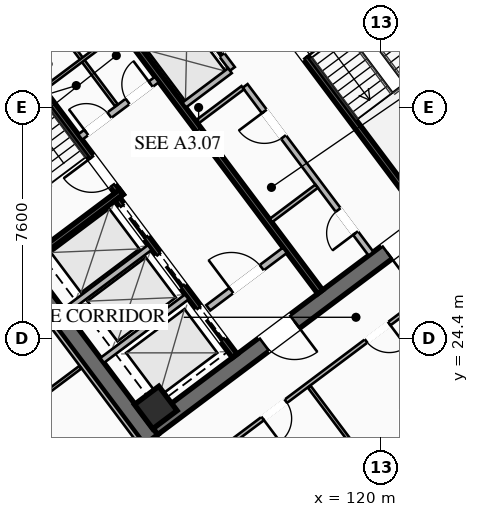
"""IFC4 building model, lengths in metres.
Left out: names, types, materials, properties, quantities, classifications, styles, units other than length and angle.
Written with IfcOpenShell. Run it as: python <this file> out.ifc"""

import sys

from ifc_helpers import new_model, si_unit, direction, frame, frame_2d, origin, origin_2d, place, context, subcontext, project, spatial, rectangle, hollow_rectangle, extrude, element, fill, save


model = new_model("IFC4")
c1 = context("Model", 3, precision=1e-05, world=origin(), true_north=direction((0.0, 1.0)))
c2 = subcontext(c1, "Body", "Model", "MODEL_VIEW")
j1 = project(units=[si_unit("LENGTHUNIT", "METRE"), si_unit("PLANEANGLEUNIT", "RADIAN")], contexts=[c1])
p1 = place(None, origin())
s1 = spatial("IfcSite", under=j1, at=p1, CompositionType="ELEMENT")
p2 = place(p1, origin())
s2 = spatial("IfcBuilding", under=s1, at=p2, CompositionType="ELEMENT")
p3 = place(p2, frame((0.0, 0.0, 174.75)))
s3 = spatial("IfcBuildingStorey", under=s2, at=p3, CompositionType="ELEMENT", Elevation=174.75)
for number, where, z_axis, x_axis in (
    (1, (112.436, 21.077, 0.0), (0.0, 0.0, 1.0), (-0.6, 0.8, 0.0)),
    (2, (115.564, 42.923, 0.0), (0.0, 0.0, 1.0), (0.6, -0.8, 0.0)),
):
    element("IfcWall", number, at=place(p3, frame(where, z_axis=z_axis, x_axis=x_axis)), inside=s3, PredefinedType="SHEAR", context=c2, shape_type="SweptSolid", body=[
        extrude(rectangle(XDim=15.6, YDim=0.55, at=frame_2d((7.8, 0.0))), origin(), (0.0, 0.0, 1.0), 3.55),
    ])
p4 = place(p3, frame((124.539, 30.498, 0.0), z_axis=(0.0, 0.0, 1.0), x_axis=(-0.799998054672, -0.600002593761, 0.0)))
e3 = element("IfcWall", 3, at=p4, inside=s3, PredefinedType="SHEAR", context=c2, shape_type="SweptSolid", body=[
    extrude(rectangle(XDim=15.06, YDim=0.55, at=frame_2d((7.53, 0.0))), origin(), (0.0, 0.0, 1.0), 3.55),
])
p5 = place(p4, frame((9.23, 0.0, 0.0)))
e4 = element("IfcOpeningElement", 4, at=p5, cuts=e3, PredefinedType="OPENING", context=c2, shape_type="SweptSolid", body=[
    extrude(rectangle(XDim=1.25, YDim=2.25, at=frame_2d((0.625, 1.125))), frame((0.0, 0.285, 0.0), z_axis=(0.0, -1.0, 0.0), x_axis=(1.0, 0.0, 0.0)), (0.0, 0.0, 1.0), 0.57),
])
p6 = place(p4, frame((4.18, 0.0, 0.0)))
e5 = element("IfcOpeningElement", 5, at=p6, cuts=e3, PredefinedType="OPENING", context=c2, shape_type="SweptSolid", body=[
    extrude(rectangle(XDim=1.25, YDim=2.25, at=frame_2d((0.625, 1.125))), frame((0.0, 0.285, 0.0), z_axis=(0.0, -1.0, 0.0), x_axis=(1.0, 0.0, 0.0)), (0.0, 0.0, 1.0), 0.57),
])
p7 = place(p3, frame((103.461, 33.502, 0.0), z_axis=(0.0, 0.0, 1.0), x_axis=(0.799998054672, 0.600002593761, 0.0)))
e6 = element("IfcWall", 6, at=p7, inside=s3, PredefinedType="SHEAR", context=c2, shape_type="SweptSolid", body=[
    extrude(rectangle(XDim=15.06, YDim=0.55, at=frame_2d((7.53, 0.0))), origin(), (0.0, 0.0, 1.0), 3.55),
])
p8 = place(p7, frame((4.58, 0.0, 0.0)))
e7 = element("IfcOpeningElement", 7, at=p8, cuts=e6, PredefinedType="OPENING", context=c2, shape_type="SweptSolid", body=[
    extrude(rectangle(XDim=1.25, YDim=2.25, at=frame_2d((0.625, 1.125))), frame((0.0, 0.285, 0.0), z_axis=(0.0, -1.0, 0.0), x_axis=(1.0, 0.0, 0.0)), (0.0, 0.0, 1.0), 0.57),
])
p9 = place(p7, frame((9.63, 0.0, 0.0)))
e8 = element("IfcOpeningElement", 8, at=p9, cuts=e6, PredefinedType="OPENING", context=c2, shape_type="SweptSolid", body=[
    extrude(rectangle(XDim=1.25, YDim=2.25, at=frame_2d((0.625, 1.125))), frame((0.0, 0.285, 0.0), z_axis=(0.0, -1.0, 0.0), x_axis=(1.0, 0.0, 0.0)), (0.0, 0.0, 1.0), 0.57),
])
p10 = place(p3, frame((112.59, 22.13, 0.0), z_axis=(0.0, 0.0, 1.0), x_axis=(0.799999996291, 0.600000004945, 0.0)))
e9 = element("IfcColumn", 9, at=p10, inside=s3, PredefinedType="COLUMN", context=c2, shape_type="SweptSolid", body=[
    extrude(hollow_rectangle(XDim=1.0, YDim=1.0, WallThickness=0.04, at=origin_2d()), origin(), (0.0, 0.0, 1.0), 3.37),
])
p11 = place(p3, frame((111.44, 29.08, 0.0), z_axis=(0.0, 0.0, 1.0), x_axis=(-0.59999029481, 0.8000072788, 0.0)))
e10 = element("IfcWall", 10, at=p11, inside=s3, PredefinedType="SHEAR", context=c2, shape_type="SweptSolid", body=[
    extrude(rectangle(XDim=8.05, YDim=0.2, at=frame_2d((4.025, 0.0))), origin(), (0.0, 0.0, 1.0), 3.37),
])
p12 = place(p11, frame((0.45, 0.0, 0.0)))
e11 = element("IfcOpeningElement", 11, at=p12, cuts=e10, PredefinedType="OPENING", context=c2, shape_type="SweptSolid", body=[
    extrude(rectangle(XDim=1.15, YDim=2.2, at=frame_2d((0.575, 1.1))), frame((0.0, 0.11, 0.0), z_axis=(0.0, -1.0, 0.0), x_axis=(1.0, 0.0, 0.0)), (0.0, 0.0, 1.0), 0.22),
])
p13 = place(p3, frame((108.396, 26.922, 0.0), z_axis=(0.0, 0.0, 1.0), x_axis=(0.800015298837, 0.599979601008, 0.0)))
e12 = element("IfcWall", 12, at=p13, inside=s3, PredefinedType="SHEAR", context=c2, shape_type="SweptSolid", body=[
    extrude(rectangle(XDim=3.83, YDim=0.2, at=frame_2d((1.915, 0.0))), origin(), (0.0, 0.0, 1.0), 3.37),
])
p14 = place(p3, frame((116.56, 34.92, 0.0), z_axis=(0.0, 0.0, 1.0), x_axis=(0.59999029481, -0.8000072788, 0.0)))
e13 = element("IfcWall", 13, at=p14, inside=s3, PredefinedType="SHEAR", context=c2, shape_type="SweptSolid", body=[
    extrude(rectangle(XDim=8.05, YDim=0.2, at=frame_2d((4.025, 0.0))), origin(), (0.0, 0.0, 1.0), 3.37),
])
p15 = place(p14, frame((0.45, 0.0, 0.0)))
e14 = element("IfcOpeningElement", 14, at=p15, cuts=e13, PredefinedType="OPENING", context=c2, shape_type="SweptSolid", body=[
    extrude(rectangle(XDim=1.15, YDim=2.2, at=frame_2d((0.575, 1.1))), frame((0.0, 0.11, 0.0), z_axis=(0.0, -1.0, 0.0), x_axis=(1.0, 0.0, 0.0)), (0.0, 0.0, 1.0), 0.22),
])
p16 = place(p3, frame((117.998, 25.936, 0.0), z_axis=(0.0, 0.0, 1.0), x_axis=(-0.600002693989, 0.799997979501, 0.0)))
e15 = element("IfcWall", 15, at=p16, inside=s3, PredefinedType="SHEAR", context=c2, shape_type="SweptSolid", body=[
    extrude(rectangle(XDim=14.5, YDim=0.2, at=frame_2d((7.25, 0.0))), origin(), (0.0, 0.0, 1.0), 3.37),
])
p17 = place(p3, frame((110.104, 31.028, 0.0), z_axis=(0.0, 0.0, 1.0), x_axis=(0.800018601094, 0.59997519774, 0.0)))
e16 = element("IfcWall", 16, at=p17, inside=s3, PredefinedType="SOLIDWALL", context=c2, shape_type="SweptSolid", body=[
    extrude(rectangle(XDim=3.15, YDim=0.22, at=frame_2d((1.575, 0.0))), origin(), (0.0, 0.0, 1.0), 2.723),
])
p18 = place(p17, frame((0.25, 0.0, 0.0)))
e17 = element("IfcOpeningElement", 17, at=p18, cuts=e16, PredefinedType="OPENING", context=c2, shape_type="SweptSolid", body=[
    extrude(rectangle(XDim=0.95, YDim=2.05, at=frame_2d((0.475, 1.025))), frame((0.0, 0.12, 0.0), z_axis=(0.0, -1.0, 0.0), x_axis=(1.0, 0.0, 0.0)), (0.0, 0.0, 1.0), 0.24),
])
p19 = place(p17, frame((1.95, 0.0, 0.0)))
e18 = element("IfcOpeningElement", 18, at=p19, cuts=e16, PredefinedType="OPENING", context=c2, shape_type="SweptSolid", body=[
    extrude(rectangle(XDim=0.95, YDim=2.05, at=frame_2d((0.475, 1.025))), frame((0.0, 0.12, 0.0), z_axis=(0.0, -1.0, 0.0), x_axis=(1.0, 0.0, 0.0)), (0.0, 0.0, 1.0), 0.24),
])
p20 = place(p3, frame((114.316, 25.412, 0.0), z_axis=(0.0, 0.0, 1.0), x_axis=(0.800018601094, 0.59997519774, 0.0)))
e19 = element("IfcWall", 19, at=p20, inside=s3, PredefinedType="SOLIDWALL", context=c2, shape_type="SweptSolid", body=[
    extrude(rectangle(XDim=3.15, YDim=0.22, at=frame_2d((1.575, 0.0))), origin(), (0.0, 0.0, 1.0), 2.723),
])
p21 = place(p20, frame((0.95, 0.0, 0.0)))
e20 = element("IfcOpeningElement", 20, at=p21, cuts=e19, PredefinedType="OPENING", context=c2, shape_type="SweptSolid", body=[
    extrude(rectangle(XDim=1.25, YDim=2.25, at=frame_2d((0.625, 1.125))), frame((0.0, 0.12, 0.0), z_axis=(0.0, -1.0, 0.0), x_axis=(1.0, 0.0, 0.0)), (0.0, 0.0, 1.0), 0.24),
])
p22 = place(p3, frame((115.19, 23.83, 0.0), z_axis=(0.0, 0.0, 1.0), x_axis=(-0.599993943644, 0.800004542231, 0.0)))
e21 = element("IfcWall", 21, at=p22, inside=s3, PredefinedType="SHEAR", context=c2, shape_type="SweptSolid", body=[
    extrude(rectangle(XDim=6.45, YDim=0.2, at=frame_2d((3.225, 0.0))), origin(), (0.0, 0.0, 1.0), 3.37),
])
p23 = place(p22, frame((4.875, 0.0, 0.0)))
e22 = element("IfcOpeningElement", 22, at=p23, cuts=e21, PredefinedType="OPENING", context=c2, shape_type="SweptSolid", body=[
    extrude(rectangle(XDim=1.3, YDim=2.25, at=frame_2d((0.65, 1.125))), frame((0.0, 0.11, 0.0), z_axis=(0.0, -1.0, 0.0), x_axis=(1.0, 0.0, 0.0)), (0.0, 0.0, 1.0), 0.22),
])
p24 = place(p22, frame((2.875, 0.0, 0.0)))
e23 = element("IfcOpeningElement", 23, at=p24, cuts=e21, PredefinedType="OPENING", context=c2, shape_type="SweptSolid", body=[
    extrude(rectangle(XDim=1.3, YDim=2.25, at=frame_2d((0.65, 1.125))), frame((0.0, 0.11, 0.0), z_axis=(0.0, -1.0, 0.0), x_axis=(1.0, 0.0, 0.0)), (0.0, 0.0, 1.0), 0.22),
])
p25 = place(p22, frame((0.675, 0.0, 0.0)))
e24 = element("IfcOpeningElement", 24, at=p25, cuts=e21, PredefinedType="OPENING", context=c2, shape_type="SweptSolid", body=[
    extrude(rectangle(XDim=1.3, YDim=2.25, at=frame_2d((0.65, 1.125))), frame((0.0, 0.11, 0.0), z_axis=(0.0, -1.0, 0.0), x_axis=(1.0, 0.0, 0.0)), (0.0, 0.0, 1.0), 0.22),
])
for number, where, z_axis, x_axis in (
    (25, (110.826, 23.682, 0.0), (0.0, 0.0, 1.0), (0.8, 0.6, 0.0)),
    (26, (109.608, 25.306, 0.0), (0.0, 0.0, 1.0), (0.8, 0.6, 0.0)),
):
    element("IfcWall", number, at=place(p3, frame(where, z_axis=z_axis, x_axis=x_axis)), inside=s3, PredefinedType="SOLIDWALL", context=c2, shape_type="SweptSolid", body=[
        extrude(rectangle(XDim=3.48, YDim=0.2, at=frame_2d((1.74, 0.0))), origin(), (0.0, 0.0, 1.0), 3.37),
    ])
p26 = place(p3, frame((111.296, 32.072, 0.0), z_axis=(0.0, 0.0, 1.0), x_axis=(-0.59995887973, 0.800030838552, 0.0)))
e27 = element("IfcWall", 27, at=p26, inside=s3, PredefinedType="PARTITIONING", context=c2, shape_type="SweptSolid", body=[
    extrude(rectangle(XDim=3.8, YDim=0.11, at=frame_2d((1.9, 0.0))), origin(), (0.0, 0.0, 1.0), 2.723),
])
p27 = place(p3, frame((108.91, 32.62, 0.0), z_axis=(0.0, 0.0, 1.0), x_axis=(0.800018601094, 0.59997519774, 0.0)))
e28 = element("IfcWall", 28, at=p27, inside=s3, PredefinedType="PARTITIONING", context=c2, shape_type="SweptSolid", body=[
    extrude(rectangle(XDim=3.15, YDim=0.11, at=frame_2d((1.575, 0.0))), origin(), (0.0, 0.0, 1.0), 2.723),
])
p28 = place(p3, frame((119.67, 27.19, 0.0), z_axis=(0.0, 0.0, 1.0), x_axis=(-0.599988677396, 0.800008491828, 0.0)))
e29 = element("IfcWall", 29, at=p28, inside=s3, PredefinedType="SOLIDWALL", context=c2, shape_type="SweptSolid", body=[
    extrude(rectangle(XDim=6.9, YDim=0.2, at=frame_2d((3.45, 0.0))), origin(), (0.0, 0.0, 1.0), 2.723),
])
p29 = place(p28, frame((0.85, 0.0, 0.0)))
e30 = element("IfcOpeningElement", 30, at=p29, cuts=e29, PredefinedType="OPENING", context=c2, shape_type="SweptSolid", body=[
    extrude(rectangle(XDim=0.95, YDim=2.05, at=frame_2d((0.475, 1.025))), frame((0.0, 0.11, 0.0), z_axis=(0.0, -1.0, 0.0), x_axis=(1.0, 0.0, 0.0)), (0.0, 0.0, 1.0), 0.22),
])
p30 = place(p28, frame((4.8, 0.0, 0.0)))
e31 = element("IfcOpeningElement", 31, at=p30, cuts=e29, PredefinedType="OPENING", context=c2, shape_type="SweptSolid", body=[
    extrude(rectangle(XDim=1.05, YDim=2.2, at=frame_2d((0.525, 1.1))), frame((0.0, 0.11, 0.0), z_axis=(0.0, -1.0, 0.0), x_axis=(1.0, 0.0, 0.0)), (0.0, 0.0, 1.0), 0.22),
])
for number, where, z_axis, x_axis in (
    (32, (113.946, 31.522, 0.0), (0.0, 0.0, 1.0), (0.8, 0.6, 0.0)),
    (33, (116.376, 28.282, 0.0), (0.0, 0.0, 1.0), (0.8, 0.6, 0.0)),
):
    element("IfcWall", number, at=place(p3, frame(where, z_axis=z_axis, x_axis=x_axis)), inside=s3, PredefinedType="PARTITIONING", context=c2, shape_type="SweptSolid", body=[
        extrude(rectangle(XDim=1.88, YDim=0.135, at=frame_2d((0.94, 0.0))), origin(), (0.0, 0.0, 1.0), 2.723),
    ])
p31 = place(p3, frame((115.11, 33.27, 0.0), z_axis=(0.0, 0.0, 1.0), x_axis=(-0.600011322243, 0.799991508192, 0.0)))
e34 = element("IfcWall", 34, at=p31, inside=s3, PredefinedType="SOLIDWALL", context=c2, shape_type="SweptSolid", body=[
    extrude(rectangle(XDim=6.9, YDim=0.2, at=frame_2d((3.45, 0.0))), origin(), (0.0, 0.0, 1.0), 3.37),
])
p32 = place(p31, frame((0.575, 0.0, 0.0)))
e35 = element("IfcOpeningElement", 35, at=p32, cuts=e34, PredefinedType="OPENING", context=c2, shape_type="SweptSolid", body=[
    extrude(rectangle(XDim=1.1, YDim=2.2, at=frame_2d((0.55, 1.1))), frame((0.0, 0.11, 0.0), z_axis=(0.0, -1.0, 0.0), x_axis=(1.0, 0.0, 0.0)), (0.0, 0.0, 1.0), 0.22),
])
p33 = place(p31, frame((2.825, 0.0, 0.0)))
e36 = element("IfcOpeningElement", 36, at=p33, cuts=e34, PredefinedType="OPENING", context=c2, shape_type="SweptSolid", body=[
    extrude(rectangle(XDim=1.1, YDim=2.2, at=frame_2d((0.55, 1.1))), frame((0.0, 0.11, 0.0), z_axis=(0.0, -1.0, 0.0), x_axis=(1.0, 0.0, 0.0)), (0.0, 0.0, 1.0), 0.22),
])
p34 = place(p31, frame((5.075, 0.0, 0.0)))
e37 = element("IfcOpeningElement", 37, at=p34, cuts=e34, PredefinedType="OPENING", context=c2, shape_type="SweptSolid", body=[
    extrude(rectangle(XDim=1.1, YDim=2.2, at=frame_2d((0.55, 1.1))), frame((0.0, 0.11, 0.0), z_axis=(0.0, -1.0, 0.0), x_axis=(1.0, 0.0, 0.0)), (0.0, 0.0, 1.0), 0.22),
])
p35 = place(p3, frame((113.526, 32.082, 0.0), z_axis=(0.0, 0.0, 1.0), x_axis=(0.800046745961, 0.599937666993, 0.0)))
e38 = element("IfcWall", 38, at=p35, inside=s3, PredefinedType="SOLIDWALL", context=c2, shape_type="SweptSolid", body=[
    extrude(rectangle(XDim=1.88, YDim=0.2, at=frame_2d((0.94, 0.0))), origin(), (0.0, 0.0, 1.0), 3.37),
])
p36 = place(p3, frame((112.176, 33.882, 0.0), z_axis=(0.0, 0.0, 1.0), x_axis=(0.8, 0.6, 0.0)))
e39 = element("IfcWall", 39, at=p36, inside=s3, PredefinedType="SOLIDWALL", context=c2, shape_type="SweptSolid", body=[
    extrude(rectangle(XDim=1.88, YDim=0.2, at=frame_2d((0.94, 0.0))), origin(), (0.0, 0.0, 1.0), 3.37),
])
p37 = place(p3, frame((95.548, 32.686, 0.0), z_axis=(0.0, 0.0, 1.0), x_axis=(0.8, 0.6, 0.0)))
e40 = element("IfcWall", 40, at=p37, inside=s3, PredefinedType="PARTITIONING", context=c2, shape_type="SweptSolid", body=[
    extrude(rectangle(XDim=28.7, YDim=0.135, at=frame_2d((14.35, 0.0))), origin(), (0.0, 0.0, 1.0), 2.723),
])
p38 = place(p37, frame((0.3, 0.0, 0.0)))
e41 = element("IfcOpeningElement", 41, at=p38, cuts=e40, PredefinedType="OPENING", context=c2, shape_type="SweptSolid", body=[
    extrude(rectangle(XDim=0.95, YDim=2.05, at=frame_2d((0.475, 1.025))), frame((0.0, 0.077, 0.0), z_axis=(0.0, -1.0, 0.0), x_axis=(1.0, 0.0, 0.0)), (0.0, 0.0, 1.0), 0.155),
])
p39 = place(p37, frame((27.45, 0.0, 0.0)))
e42 = element("IfcOpeningElement", 42, at=p39, cuts=e40, PredefinedType="OPENING", context=c2, shape_type="SweptSolid", body=[
    extrude(rectangle(XDim=0.95, YDim=2.05, at=frame_2d((0.475, 1.025))), frame((0.0, 0.077, 0.0), z_axis=(0.0, -1.0, 0.0), x_axis=(1.0, 0.0, 0.0)), (0.0, 0.0, 1.0), 0.155),
])
p40 = place(p3, frame((131.15, 33.05, 0.0), z_axis=(0.0, 0.0, 1.0), x_axis=(-0.8, -0.6, 0.0)))
e43 = element("IfcWall", 43, at=p40, inside=s3, PredefinedType="PARTITIONING", context=c2, shape_type="SweptSolid", body=[
    extrude(rectangle(XDim=28.7, YDim=0.135, at=frame_2d((14.35, 0.0))), origin(), (0.0, 0.0, 1.0), 2.723),
])
p41 = place(p40, frame((27.37, 0.0, 0.0)))
e44 = element("IfcOpeningElement", 44, at=p41, cuts=e43, PredefinedType="OPENING", context=c2, shape_type="SweptSolid", body=[
    extrude(rectangle(XDim=0.95, YDim=2.05, at=frame_2d((0.475, 1.025))), frame((0.0, 0.077, 0.0), z_axis=(0.0, -1.0, 0.0), x_axis=(1.0, 0.0, 0.0)), (0.0, 0.0, 1.0), 0.155),
])
p42 = place(p40, frame((17.851, 0.0, 0.0)))
e45 = element("IfcOpeningElement", 45, at=p42, cuts=e43, PredefinedType="OPENING", context=c2, shape_type="SweptSolid", body=[
    extrude(rectangle(XDim=0.95, YDim=2.05, at=frame_2d((0.475, 1.025))), frame((0.0, 0.077, 0.0), z_axis=(0.0, -1.0, 0.0), x_axis=(1.0, 0.0, 0.0)), (0.0, 0.0, 1.0), 0.155),
])
p43 = place(p40, frame((13.601, 0.0, 0.0)))
e46 = element("IfcOpeningElement", 46, at=p43, cuts=e43, PredefinedType="OPENING", context=c2, shape_type="SweptSolid", body=[
    extrude(rectangle(XDim=0.95, YDim=2.05, at=frame_2d((0.475, 1.025))), frame((0.0, 0.077, 0.0), z_axis=(0.0, -1.0, 0.0), x_axis=(1.0, 0.0, 0.0)), (0.0, 0.0, 1.0), 0.155),
])
p44 = place(p40, frame((9.62, 0.0, 0.0)))
e47 = element("IfcOpeningElement", 47, at=p44, cuts=e43, PredefinedType="OPENING", context=c2, shape_type="SweptSolid", body=[
    extrude(rectangle(XDim=0.95, YDim=2.05, at=frame_2d((0.475, 1.025))), frame((0.0, 0.077, 0.0), z_axis=(0.0, -1.0, 0.0), x_axis=(1.0, 0.0, 0.0)), (0.0, 0.0, 1.0), 0.155),
])
p45 = place(p40, frame((0.38, 0.0, 0.0)))
e48 = element("IfcOpeningElement", 48, at=p45, cuts=e43, PredefinedType="OPENING", context=c2, shape_type="SweptSolid", body=[
    extrude(rectangle(XDim=0.95, YDim=2.05, at=frame_2d((0.475, 1.025))), frame((0.0, 0.077, 0.0), z_axis=(0.0, -1.0, 0.0), x_axis=(1.0, 0.0, 0.0)), (0.0, 0.0, 1.0), 0.155),
])
p46 = place(p3, frame((121.988, 17.016, 0.0), z_axis=(0.0, 0.0, 1.0), x_axis=(-0.600021551797, 0.799983835699, 0.0)))
e49 = element("IfcWall", 49, at=p46, inside=s3, PredefinedType="PARTITIONING", context=c2, shape_type="SweptSolid", body=[
    extrude(rectangle(XDim=7.25, YDim=0.11, at=frame_2d((3.625, 0.0))), origin(), (0.0, 0.0, 1.0), 2.723),
])
p47 = place(p3, frame((112.104, 20.928, 0.0), z_axis=(0.0, 0.0, 1.0), x_axis=(-0.599994940075, 0.800003794918, 0.0)))
e50 = element("IfcWall", 50, at=p47, inside=s3, PredefinedType="PARTITIONING", context=c2, shape_type="SweptSolid", body=[
    extrude(rectangle(XDim=15.44, YDim=0.135, at=frame_2d((7.72, 0.0))), origin(), (0.0, 0.0, 1.0), 2.723),
])
p48 = place(p3, frame((103.396, 18.422, 0.0), z_axis=(0.0, 0.0, 1.0), x_axis=(0.8, 0.6, 0.0)))
e51 = element("IfcWall", 51, at=p48, inside=s3, PredefinedType="PARTITIONING", context=c2, shape_type="SweptSolid", body=[
    extrude(rectangle(XDim=8.39, YDim=0.11, at=frame_2d((4.195, 0.0))), origin(), (0.0, 0.0, 1.0), 2.723),
])
p49 = place(p5, origin())
e52 = element("IfcDoor", 52, at=p49, inside=s3, OperationType="SINGLE_SWING_LEFT", PredefinedType="DOOR", context=c2, shape_type="SweptSolid", body=[
    extrude(rectangle(XDim=1.25, YDim=2.25, at=frame_2d((0.625, 1.125))), frame((0.0, 0.025, 0.0), z_axis=(0.0, -1.0, 0.0), x_axis=(1.0, 0.0, 0.0)), (0.0, 0.0, 1.0), 0.05),
])
fill(e4, e52)
p50 = place(p6, origin())
e53 = element("IfcDoor", 53, at=p50, inside=s3, OperationType="SINGLE_SWING_RIGHT", PredefinedType="DOOR", context=c2, shape_type="SweptSolid", body=[
    extrude(rectangle(XDim=1.25, YDim=2.25, at=frame_2d((0.625, 1.125))), frame((0.0, 0.025, 0.0), z_axis=(0.0, -1.0, 0.0), x_axis=(1.0, 0.0, 0.0)), (0.0, 0.0, 1.0), 0.05),
])
fill(e5, e53)
p51 = place(p12, origin())
e54 = element("IfcDoor", 54, at=p51, inside=s3, OperationType="SINGLE_SWING_RIGHT", PredefinedType="DOOR", context=c2, shape_type="SweptSolid", body=[
    extrude(rectangle(XDim=1.15, YDim=2.2, at=frame_2d((0.575, 1.1))), frame((0.0, 0.025, 0.0), z_axis=(0.0, -1.0, 0.0), x_axis=(1.0, 0.0, 0.0)), (0.0, 0.0, 1.0), 0.05),
])
fill(e11, e54)
p52 = place(p15, origin())
e55 = element("IfcDoor", 55, at=p52, inside=s3, OperationType="SINGLE_SWING_RIGHT", PredefinedType="DOOR", context=c2, shape_type="SweptSolid", body=[
    extrude(rectangle(XDim=1.15, YDim=2.2, at=frame_2d((0.575, 1.1))), frame((0.0, 0.025, 0.0), z_axis=(0.0, -1.0, 0.0), x_axis=(1.0, 0.0, 0.0)), (0.0, 0.0, 1.0), 0.05),
])
fill(e14, e55)
p53 = place(p21, origin())
e56 = element("IfcDoor", 56, at=p53, inside=s3, OperationType="SINGLE_SWING_LEFT", PredefinedType="DOOR", context=c2, shape_type="SweptSolid", body=[
    extrude(rectangle(XDim=1.25, YDim=2.25, at=frame_2d((0.625, 1.125))), frame((0.0, 0.025, 0.0), z_axis=(0.0, -1.0, 0.0), x_axis=(1.0, 0.0, 0.0)), (0.0, 0.0, 1.0), 0.05),
])
fill(e20, e56)
p54 = place(p18, origin())
e57 = element("IfcDoor", 57, at=p54, inside=s3, OperationType="SINGLE_SWING_LEFT", PredefinedType="DOOR", context=c2, shape_type="SweptSolid", body=[
    extrude(rectangle(XDim=0.95, YDim=2.05, at=frame_2d((0.475, 1.025))), frame((0.0, 0.025, 0.0), z_axis=(0.0, -1.0, 0.0), x_axis=(1.0, 0.0, 0.0)), (0.0, 0.0, 1.0), 0.05),
])
fill(e17, e57)
p55 = place(p19, origin())
e58 = element("IfcDoor", 58, at=p55, inside=s3, OperationType="SINGLE_SWING_RIGHT", PredefinedType="DOOR", context=c2, shape_type="SweptSolid", body=[
    extrude(rectangle(XDim=0.95, YDim=2.05, at=frame_2d((0.475, 1.025))), frame((0.0, 0.025, 0.0), z_axis=(0.0, -1.0, 0.0), x_axis=(1.0, 0.0, 0.0)), (0.0, 0.0, 1.0), 0.05),
])
fill(e18, e58)
p56 = place(p29, origin())
e59 = element("IfcDoor", 59, at=p56, inside=s3, OperationType="SINGLE_SWING_LEFT", PredefinedType="DOOR", context=c2, shape_type="SweptSolid", body=[
    extrude(rectangle(XDim=0.95, YDim=2.05, at=frame_2d((0.475, 1.025))), frame((0.0, 0.025, 0.0), z_axis=(0.0, -1.0, 0.0), x_axis=(1.0, 0.0, 0.0)), (0.0, 0.0, 1.0), 0.05),
])
fill(e30, e59)
p57 = place(p30, origin())
e60 = element("IfcDoor", 60, at=p57, inside=s3, OperationType="SINGLE_SWING_RIGHT", PredefinedType="DOOR", context=c2, shape_type="SweptSolid", body=[
    extrude(rectangle(XDim=1.05, YDim=2.2, at=frame_2d((0.525, 1.1))), frame((0.0, 0.025, 0.0), z_axis=(0.0, -1.0, 0.0), x_axis=(1.0, 0.0, 0.0)), (0.0, 0.0, 1.0), 0.05),
])
fill(e31, e60)
p58 = place(p42, origin())
e61 = element("IfcDoor", 61, at=p58, inside=s3, OperationType="SINGLE_SWING_RIGHT", PredefinedType="DOOR", context=c2, shape_type="SweptSolid", body=[
    extrude(rectangle(XDim=0.95, YDim=2.05, at=frame_2d((0.475, 1.025))), frame((0.0, 0.025, 0.0), z_axis=(0.0, -1.0, 0.0), x_axis=(1.0, 0.0, 0.0)), (0.0, 0.0, 1.0), 0.05),
])
fill(e45, e61)
p59 = place(p43, origin())
e62 = element("IfcDoor", 62, at=p59, inside=s3, OperationType="SINGLE_SWING_LEFT", PredefinedType="DOOR", context=c2, shape_type="SweptSolid", body=[
    extrude(rectangle(XDim=0.95, YDim=2.05, at=frame_2d((0.475, 1.025))), frame((0.0, 0.025, 0.0), z_axis=(0.0, -1.0, 0.0), x_axis=(1.0, 0.0, 0.0)), (0.0, 0.0, 1.0), 0.05),
])
fill(e46, e62)
p60 = place(p23, origin())
e63 = element("IfcDoor", 63, at=p60, inside=s3, OperationType="SLIDING_TO_LEFT", PredefinedType="DOOR", context=c2, shape_type="SweptSolid", body=[
    extrude(rectangle(XDim=1.3, YDim=2.25, at=frame_2d((0.65, 1.125))), frame((0.0, 0.025, 0.0), z_axis=(0.0, -1.0, 0.0), x_axis=(1.0, 0.0, 0.0)), (0.0, 0.0, 1.0), 0.05),
])
fill(e22, e63)
p61 = place(p24, origin())
e64 = element("IfcDoor", 64, at=p61, inside=s3, OperationType="SLIDING_TO_LEFT", PredefinedType="DOOR", context=c2, shape_type="SweptSolid", body=[
    extrude(rectangle(XDim=1.3, YDim=2.25, at=frame_2d((0.65, 1.125))), frame((0.0, 0.025, 0.0), z_axis=(0.0, -1.0, 0.0), x_axis=(1.0, 0.0, 0.0)), (0.0, 0.0, 1.0), 0.05),
])
fill(e23, e64)
p62 = place(p25, origin())
e65 = element("IfcDoor", 65, at=p62, inside=s3, OperationType="SLIDING_TO_LEFT", PredefinedType="DOOR", context=c2, shape_type="SweptSolid", body=[
    extrude(rectangle(XDim=1.3, YDim=2.25, at=frame_2d((0.65, 1.125))), frame((0.0, 0.025, 0.0), z_axis=(0.0, -1.0, 0.0), x_axis=(1.0, 0.0, 0.0)), (0.0, 0.0, 1.0), 0.05),
])
fill(e24, e65)
p63 = place(p32, origin())
e66 = element("IfcDoor", 66, at=p63, inside=s3, OperationType="SLIDING_TO_LEFT", PredefinedType="DOOR", context=c2, shape_type="SweptSolid", body=[
    extrude(rectangle(XDim=1.1, YDim=2.2, at=frame_2d((0.55, 1.1))), frame((0.0, 0.025, 0.0), z_axis=(0.0, -1.0, 0.0), x_axis=(1.0, 0.0, 0.0)), (0.0, 0.0, 1.0), 0.05),
])
fill(e35, e66)
save(model, sys.argv[1])
